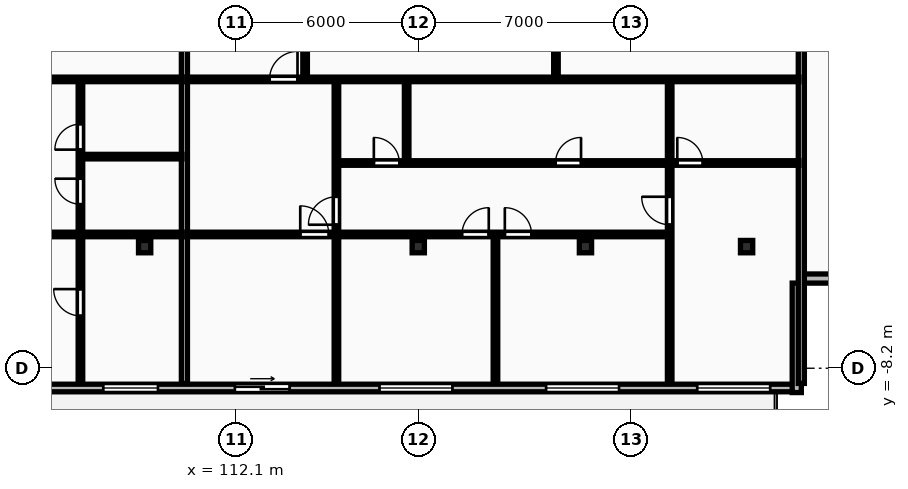
"""IFC4 building model, lengths in metres.
Left out: names, types, materials, properties, quantities, classifications, styles, units other than length and angle.
Written with IfcOpenShell. Run it as: python <this file> out.ifc"""

import sys

from ifc_helpers import new_model, si_unit, direction, frame, frame_2d, origin, origin_2d, place, context, subcontext, project, spatial, rectangle, i_section, extrude, element, fill, save


model = new_model("IFC4")
c1 = context("Model", 3, precision=1e-05, world=origin(), true_north=direction((0.0, 1.0)))
c2 = subcontext(c1, "Body", "Model", "MODEL_VIEW")
j1 = project(units=[si_unit("LENGTHUNIT", "METRE"), si_unit("PLANEANGLEUNIT", "RADIAN")], contexts=[c1])
p1 = place(None, origin())
s1 = spatial("IfcSite", under=j1, at=p1, CompositionType="ELEMENT")
p2 = place(p1, origin())
s2 = spatial("IfcBuilding", under=s1, at=p2, CompositionType="ELEMENT")
p3 = place(p2, frame((0.0, 0.0, 142.9)))
s3 = spatial("IfcBuildingStorey", under=s2, at=p3, CompositionType="ELEMENT", Elevation=142.9)
for number, where, z_axis, x_axis in (
    (1, (109.1, -4.2, 0.0), (0.0, 0.0, 1.0), (1.0, 0.0, 0.0)),
    (2, (118.1, -4.2, 0.0), (0.0, 0.0, 1.0), (1.0, 0.0, 0.0)),
    (3, (123.6, -4.2, 0.0), (0.0, 0.0, 1.0), (1.0, 0.0, 0.0)),
    (4, (128.9, -4.2, 0.0), (0.0, 0.0, 1.0), (1.0, 0.0, 0.0)),
):
    element("IfcColumn", number, at=place(p3, frame(where, z_axis=z_axis, x_axis=x_axis)), inside=s3, PredefinedType="COLUMN", context=c2, shape_type="SweptSolid", body=[
        extrude(i_section(OverallWidth=0.403, OverallDepth=0.406, WebThickness=0.027, FlangeThickness=0.043, FilletRadius=0.015, at=origin_2d()), origin(), (0.0, 0.0, 1.0), 3.6),
    ])
p4 = place(p3, frame((72.7, -8.85, 0.0), z_axis=(0.0, 0.0, 1.0), x_axis=(1.0, 0.0, 0.0)))
e5 = element("IfcWall", 5, at=p4, inside=s3, PredefinedType="STANDARD", context=c2, shape_type="SweptSolid", body=[
    extrude(rectangle(XDim=58.0, YDim=0.25, at=frame_2d((29.0, 0.0))), origin(), (0.0, 0.0, 1.0), 3.31),
])
p5 = place(p4, frame((6.73, 0.0, 0.85)))
e6 = element("IfcOpeningElement", 6, at=p5, cuts=e5, PredefinedType="OPENING", context=c2, shape_type="SweptSolid", body=[
    extrude(rectangle(XDim=2.4, YDim=1.9, at=frame_2d((1.2, 0.95))), frame((0.0, 0.135, 0.0), z_axis=(0.0, -1.0, 0.0), x_axis=(1.0, 0.0, 0.0)), (0.0, 0.0, 1.0), 0.27),
])
p6 = place(p4, frame((12.7, 0.0, 0.85)))
e7 = element("IfcOpeningElement", 7, at=p6, cuts=e5, PredefinedType="OPENING", context=c2, shape_type="SweptSolid", body=[
    extrude(rectangle(XDim=2.4, YDim=1.9, at=frame_2d((1.2, 0.95))), frame((0.0, 0.135, 0.0), z_axis=(0.0, -1.0, 0.0), x_axis=(1.0, 0.0, 0.0)), (0.0, 0.0, 1.0), 0.27),
])
p7 = place(p4, frame((1.45, 0.0, 0.0)))
e8 = element("IfcOpeningElement", 8, at=p7, cuts=e5, PredefinedType="OPENING", context=c2, shape_type="SweptSolid", body=[
    extrude(rectangle(XDim=1.8, YDim=2.2, at=frame_2d((0.9, 1.1))), frame((0.0, 0.135, 0.0), z_axis=(0.0, -1.0, 0.0), x_axis=(1.0, 0.0, 0.0)), (0.0, 0.0, 1.0), 0.27),
])
p8 = place(p4, frame((18.125, 0.0, 0.85)))
e9 = element("IfcOpeningElement", 9, at=p8, cuts=e5, PredefinedType="OPENING", context=c2, shape_type="SweptSolid", body=[
    extrude(rectangle(XDim=2.4, YDim=1.9, at=frame_2d((1.2, 0.95))), frame((0.0, 0.135, 0.0), z_axis=(0.0, -1.0, 0.0), x_axis=(1.0, 0.0, 0.0)), (0.0, 0.0, 1.0), 0.27),
])
p9 = place(p4, frame((27.429, 0.0, 0.0)))
e10 = element("IfcOpeningElement", 10, at=p9, cuts=e5, PredefinedType="OPENING", context=c2, shape_type="SweptSolid", body=[
    extrude(rectangle(XDim=1.8, YDim=2.2, at=frame_2d((0.9, 1.1))), frame((0.0, 0.135, 0.0), z_axis=(0.0, -1.0, 0.0), x_axis=(1.0, 0.0, 0.0)), (0.0, 0.0, 1.0), 0.27),
])
p10 = place(p4, frame((35.038, 0.0, 0.85)))
e11 = element("IfcOpeningElement", 11, at=p10, cuts=e5, PredefinedType="OPENING", context=c2, shape_type="SweptSolid", body=[
    extrude(rectangle(XDim=1.8, YDim=1.8, at=frame_2d((0.9, 0.9))), frame((0.0, 0.135, 0.0), z_axis=(0.0, -1.0, 0.0), x_axis=(1.0, 0.0, 0.0)), (0.0, 0.0, 1.0), 0.27),
])
p11 = place(p4, frame((44.124, 0.0, 0.85)))
e12 = element("IfcOpeningElement", 12, at=p11, cuts=e5, PredefinedType="OPENING", context=c2, shape_type="SweptSolid", body=[
    extrude(rectangle(XDim=2.4, YDim=1.9, at=frame_2d((1.2, 0.95))), frame((0.0, 0.135, 0.0), z_axis=(0.0, -1.0, 0.0), x_axis=(1.0, 0.0, 0.0)), (0.0, 0.0, 1.0), 0.27),
])
p12 = place(p4, frame((49.604, 0.0, 0.85)))
e13 = element("IfcOpeningElement", 13, at=p12, cuts=e5, PredefinedType="OPENING", context=c2, shape_type="SweptSolid", body=[
    extrude(rectangle(XDim=2.4, YDim=1.9, at=frame_2d((1.2, 0.95))), frame((0.0, 0.135, 0.0), z_axis=(0.0, -1.0, 0.0), x_axis=(1.0, 0.0, 0.0)), (0.0, 0.0, 1.0), 0.27),
])
p13 = place(p4, frame((39.368, 0.0, 0.0)))
e14 = element("IfcOpeningElement", 14, at=p13, cuts=e5, PredefinedType="OPENING", context=c2, shape_type="SweptSolid", body=[
    extrude(rectangle(XDim=1.8, YDim=2.2, at=frame_2d((0.9, 1.1))), frame((0.0, 0.135, 0.0), z_axis=(0.0, -1.0, 0.0), x_axis=(1.0, 0.0, 0.0)), (0.0, 0.0, 1.0), 0.27),
])
p14 = place(p4, frame((54.575, 0.0, 0.85)))
e15 = element("IfcOpeningElement", 15, at=p14, cuts=e5, PredefinedType="OPENING", context=c2, shape_type="SweptSolid", body=[
    extrude(rectangle(XDim=2.4, YDim=1.9, at=frame_2d((1.2, 0.95))), frame((0.0, 0.135, 0.0), z_axis=(0.0, -1.0, 0.0), x_axis=(1.0, 0.0, 0.0)), (0.0, 0.0, 1.0), 0.27),
])
for number, where, z_axis, x_axis in (
    (16, (130.55, -9.0, 0.0), (0.0, 0.0, 1.0), (0.0, 1.0, 0.0)),
    (17, (130.7, -5.25, 0.0), (0.0, 0.0, 1.0), (1.0, 0.0, 0.0)),
):
    element("IfcWall", number, at=place(p3, frame(where, z_axis=z_axis, x_axis=x_axis)), inside=s3, PredefinedType="STANDARD", context=c2, shape_type="SweptSolid", body=[
        extrude(rectangle(XDim=3.6, YDim=0.3, at=frame_2d((1.8, 0.0))), origin(), (0.0, 0.0, 1.0), 3.31),
    ])
for number, where, z_axis, x_axis in (
    (18, (130.7, -8.7, 0.0), (0.0, 0.0, 1.0), (0.0, 1.0, 0.0)),
    (19, (110.408, -8.7, 0.0), (0.0, 0.0, 1.0), (0.0, 1.0, 0.0)),
):
    element("IfcWall", number, at=place(p3, frame(where, z_axis=z_axis, x_axis=x_axis)), inside=s3, PredefinedType="PARTITIONING", context=c2, shape_type="SweptSolid", body=[
        extrude(rectangle(XDim=24.57, YDim=0.2, at=frame_2d((12.285, 0.0))), origin(), (0.0, 0.0, 1.0), 3.31),
    ])
p15 = place(p3, frame((107.048, -1.24, 0.0), z_axis=(0.0, 0.0, 1.0), x_axis=(1.0, 0.0, 0.0)))
e20 = element("IfcWall", 20, at=p15, inside=s3, PredefinedType="PARTITIONING", context=c2, shape_type="SweptSolid", body=[
    extrude(rectangle(XDim=3.28, YDim=0.15, at=frame_2d((1.64, 0.0))), origin(), (0.0, 0.0, 1.0), 3.31),
])
p16 = place(p3, frame((106.988, -8.7, 0.0), z_axis=(0.0, 0.0, 1.0), x_axis=(0.0, 1.0, 0.0)))
e21 = element("IfcWall", 21, at=p16, inside=s3, PredefinedType="PARTITIONING", context=c2, shape_type="SweptSolid", body=[
    extrude(rectangle(XDim=9.96, YDim=0.15, at=frame_2d((4.98, 0.0))), origin(), (0.0, 0.0, 1.0), 3.31),
])
p17 = place(p16, frame((5.894, 0.0, 0.0)))
e22 = element("IfcOpeningElement", 22, at=p17, cuts=e21, PredefinedType="OPENING", context=c2, shape_type="SweptSolid", body=[
    extrude(rectangle(XDim=0.84, YDim=2.04, at=frame_2d((0.42, 1.02))), frame((0.0, 0.085, 0.0), z_axis=(0.0, -1.0, 0.0), x_axis=(1.0, 0.0, 0.0)), (0.0, 0.0, 1.0), 0.17),
])
p18 = place(p16, frame((7.69, 0.0, 0.0)))
e23 = element("IfcOpeningElement", 23, at=p18, cuts=e21, PredefinedType="OPENING", context=c2, shape_type="SweptSolid", body=[
    extrude(rectangle(XDim=0.84, YDim=2.04, at=frame_2d((0.42, 1.02))), frame((0.0, 0.085, 0.0), z_axis=(0.0, -1.0, 0.0), x_axis=(1.0, 0.0, 0.0)), (0.0, 0.0, 1.0), 0.17),
])
p19 = place(p16, frame((2.223, 0.0, 0.0)))
e24 = element("IfcOpeningElement", 24, at=p19, cuts=e21, PredefinedType="OPENING", context=c2, shape_type="SweptSolid", body=[
    extrude(rectangle(XDim=0.88, YDim=2.06, at=frame_2d((0.44, 1.03))), frame((0.0, 0.085, 0.0), z_axis=(0.0, -1.0, 0.0), x_axis=(1.0, 0.0, 0.0)), (0.0, 0.0, 1.0), 0.17),
])
p20 = place(p3, frame((95.03, 1.3, 0.0), z_axis=(0.0, 0.0, 1.0), x_axis=(1.0, 0.0, 0.0)))
e25 = element("IfcWall", 25, at=p20, inside=s3, PredefinedType="PARTITIONING", context=c2, shape_type="SweptSolid", body=[
    extrude(rectangle(XDim=15.298, YDim=0.15, at=frame_2d((7.649, 0.0))), origin(), (0.0, 0.0, 1.0), 3.31),
])
p21 = place(p20, frame((2.72, 0.0, 0.0)))
e26 = element("IfcOpeningElement", 26, at=p21, cuts=e25, PredefinedType="OPENING", context=c2, shape_type="SweptSolid", body=[
    extrude(rectangle(XDim=0.92, YDim=2.08, at=frame_2d((0.46, 1.04))), frame((0.0, 0.085, 0.0), z_axis=(0.0, -1.0, 0.0), x_axis=(1.0, 0.0, 0.0)), (0.0, 0.0, 1.0), 0.17),
])
p22 = place(p3, frame((95.03, -3.8, 0.0), z_axis=(0.0, 0.0, 1.0), x_axis=(1.0, 0.0, 0.0)))
e27 = element("IfcWall", 27, at=p22, inside=s3, PredefinedType="PARTITIONING", context=c2, shape_type="SweptSolid", body=[
    extrude(rectangle(XDim=15.298, YDim=0.15, at=frame_2d((7.649, 0.0))), origin(), (0.0, 0.0, 1.0), 3.31),
])
p23 = place(p22, frame((7.179, 0.0, 0.0)))
e28 = element("IfcOpeningElement", 28, at=p23, cuts=e27, PredefinedType="OPENING", context=c2, shape_type="SweptSolid", body=[
    extrude(rectangle(XDim=0.94, YDim=2.1, at=frame_2d((0.47, 1.05))), frame((0.0, 0.085, 0.0), z_axis=(0.0, -1.0, 0.0), x_axis=(1.0, 0.0, 0.0)), (0.0, 0.0, 1.0), 0.17),
])
p24 = place(p3, frame((122.629, 1.34, 0.0), z_axis=(0.0, 0.0, 1.0), x_axis=(0.0, 1.0, 0.0)))
e29 = element("IfcWall", 29, at=p24, inside=s3, PredefinedType="PARTITIONING", context=c2, shape_type="SweptSolid", body=[
    extrude(rectangle(XDim=14.55, YDim=0.15, at=frame_2d((7.275, 0.0))), origin(), (0.0, 0.0, 1.0), 3.31),
])
p25 = place(p24, frame((3.177, 0.0, 0.0)))
e30 = element("IfcOpeningElement", 30, at=p25, cuts=e29, PredefinedType="OPENING", context=c2, shape_type="SweptSolid", body=[
    extrude(rectangle(XDim=0.84, YDim=2.04, at=frame_2d((0.42, 1.02))), frame((0.0, 0.085, 0.0), z_axis=(0.0, -1.0, 0.0), x_axis=(1.0, 0.0, 0.0)), (0.0, 0.0, 1.0), 0.17),
])
p26 = place(p24, frame((7.345, 0.0, 0.0)))
e31 = element("IfcOpeningElement", 31, at=p26, cuts=e29, PredefinedType="OPENING", context=c2, shape_type="SweptSolid", body=[
    extrude(rectangle(XDim=0.88, YDim=2.06, at=frame_2d((0.44, 1.03))), frame((0.0, 0.085, 0.0), z_axis=(0.0, -1.0, 0.0), x_axis=(1.0, 0.0, 0.0)), (0.0, 0.0, 1.0), 0.17),
])
p27 = place(p3, frame((114.378, 1.34, 0.0), z_axis=(0.0, 0.0, 1.0), x_axis=(0.0, 1.0, 0.0)))
e32 = element("IfcWall", 32, at=p27, inside=s3, PredefinedType="PARTITIONING", context=c2, shape_type="SweptSolid", body=[
    extrude(rectangle(XDim=14.55, YDim=0.15, at=frame_2d((7.275, 0.0))), origin(), (0.0, 0.0, 1.0), 3.31),
])
p28 = place(p27, frame((5.965, 0.0, 0.0)))
e33 = element("IfcOpeningElement", 33, at=p28, cuts=e32, PredefinedType="OPENING", context=c2, shape_type="SweptSolid", body=[
    extrude(rectangle(XDim=0.88, YDim=2.06, at=frame_2d((0.44, 1.03))), frame((0.0, 0.085, 0.0), z_axis=(0.0, -1.0, 0.0), x_axis=(1.0, 0.0, 0.0)), (0.0, 0.0, 1.0), 0.17),
])
p29 = place(p3, frame((117.718, -1.43, 0.0), z_axis=(0.0, 0.0, 1.0), x_axis=(0.0, 1.0, 0.0)))
e34 = element("IfcWall", 34, at=p29, inside=s3, PredefinedType="PARTITIONING", context=c2, shape_type="SweptSolid", body=[
    extrude(rectangle(XDim=2.69, YDim=0.15, at=frame_2d((1.345, 0.0))), origin(), (0.0, 0.0, 1.0), 3.31),
])
p30 = place(p3, frame((120.639, -8.7, 0.0), z_axis=(0.0, 0.0, 1.0), x_axis=(0.0, 1.0, 0.0)))
e35 = element("IfcWall", 35, at=p30, inside=s3, PredefinedType="PARTITIONING", context=c2, shape_type="SweptSolid", body=[
    extrude(rectangle(XDim=4.82, YDim=0.15, at=frame_2d((2.41, 0.0))), origin(), (0.0, 0.0, 1.0), 3.31),
])
p31 = place(p3, frame((115.408, -8.7, 0.0), z_axis=(0.0, 0.0, 1.0), x_axis=(0.0, 1.0, 0.0)))
e36 = element("IfcWall", 36, at=p31, inside=s3, PredefinedType="PARTITIONING", context=c2, shape_type="SweptSolid", body=[
    extrude(rectangle(XDim=9.96, YDim=0.15, at=frame_2d((4.98, 0.0))), origin(), (0.0, 0.0, 1.0), 3.31),
])
p32 = place(p31, frame((5.22, 0.0, 0.0)))
e37 = element("IfcOpeningElement", 37, at=p32, cuts=e36, PredefinedType="OPENING", context=c2, shape_type="SweptSolid", body=[
    extrude(rectangle(XDim=0.92, YDim=2.08, at=frame_2d((0.46, 1.04))), frame((0.0, 0.085, 0.0), z_axis=(0.0, -1.0, 0.0), x_axis=(1.0, 0.0, 0.0)), (0.0, 0.0, 1.0), 0.17),
])
p33 = place(p3, frame((126.37, -1.43, 0.0), z_axis=(0.0, 0.0, 1.0), x_axis=(0.0, 1.0, 0.0)))
e38 = element("IfcWall", 38, at=p33, inside=s3, PredefinedType="PARTITIONING", context=c2, shape_type="SweptSolid", body=[
    extrude(rectangle(XDim=2.69, YDim=0.15, at=frame_2d((1.345, 0.0))), origin(), (0.0, 0.0, 1.0), 3.31),
])
p34 = place(p3, frame((126.37, -8.7, 0.0), z_axis=(0.0, 0.0, 1.0), x_axis=(0.0, 1.0, 0.0)))
e39 = element("IfcWall", 39, at=p34, inside=s3, PredefinedType="PARTITIONING", context=c2, shape_type="SweptSolid", body=[
    extrude(rectangle(XDim=7.23, YDim=0.15, at=frame_2d((3.615, 0.0))), origin(), (0.0, 0.0, 1.0), 3.31),
])
p35 = place(p34, frame((5.22, 0.0, 0.0)))
e40 = element("IfcOpeningElement", 40, at=p35, cuts=e39, PredefinedType="OPENING", context=c2, shape_type="SweptSolid", body=[
    extrude(rectangle(XDim=0.92, YDim=2.08, at=frame_2d((0.46, 1.04))), frame((0.0, 0.085, 0.0), z_axis=(0.0, -1.0, 0.0), x_axis=(1.0, 0.0, 0.0)), (0.0, 0.0, 1.0), 0.17),
])
p36 = place(p3, frame((115.448, -1.45, 0.0), z_axis=(0.0, 0.0, 1.0), x_axis=(1.0, 0.0, 0.0)))
e41 = element("IfcWall", 41, at=p36, inside=s3, PredefinedType="PARTITIONING", context=c2, shape_type="SweptSolid", body=[
    extrude(rectangle(XDim=15.172, YDim=0.15, at=frame_2d((7.586, 0.0))), origin(), (0.0, 0.0, 1.0), 3.31),
])
p37 = place(p36, frame((1.191, 0.0, 0.0)))
e42 = element("IfcOpeningElement", 42, at=p37, cuts=e41, PredefinedType="OPENING", context=c2, shape_type="SweptSolid", body=[
    extrude(rectangle(XDim=0.84, YDim=2.04, at=frame_2d((0.42, 1.02))), frame((0.0, 0.085, 0.0), z_axis=(0.0, -1.0, 0.0), x_axis=(1.0, 0.0, 0.0)), (0.0, 0.0, 1.0), 0.17),
])
p38 = place(p36, frame((7.166, 0.0, 0.0)))
e43 = element("IfcOpeningElement", 43, at=p38, cuts=e41, PredefinedType="OPENING", context=c2, shape_type="SweptSolid", body=[
    extrude(rectangle(XDim=0.84, YDim=2.04, at=frame_2d((0.42, 1.02))), frame((0.0, 0.085, 0.0), z_axis=(0.0, -1.0, 0.0), x_axis=(1.0, 0.0, 0.0)), (0.0, 0.0, 1.0), 0.17),
])
p39 = place(p36, frame((11.172, 0.0, 0.0)))
e44 = element("IfcOpeningElement", 44, at=p39, cuts=e41, PredefinedType="OPENING", context=c2, shape_type="SweptSolid", body=[
    extrude(rectangle(XDim=0.84, YDim=2.04, at=frame_2d((0.42, 1.02))), frame((0.0, 0.085, 0.0), z_axis=(0.0, -1.0, 0.0), x_axis=(1.0, 0.0, 0.0)), (0.0, 0.0, 1.0), 0.17),
])
p40 = place(p3, frame((110.488, 1.3, 0.0), z_axis=(0.0, 0.0, 1.0), x_axis=(1.0, 0.0, 0.0)))
e45 = element("IfcWall", 45, at=p40, inside=s3, PredefinedType="PARTITIONING", context=c2, shape_type="SweptSolid", body=[
    extrude(rectangle(XDim=20.132, YDim=0.15, at=frame_2d((10.066, 0.0))), origin(), (0.0, 0.0, 1.0), 3.31),
])
p41 = place(p40, frame((2.72, 0.0, 0.0)))
e46 = element("IfcOpeningElement", 46, at=p41, cuts=e45, PredefinedType="OPENING", context=c2, shape_type="SweptSolid", body=[
    extrude(rectangle(XDim=0.92, YDim=2.08, at=frame_2d((0.46, 1.04))), frame((0.0, 0.085, 0.0), z_axis=(0.0, -1.0, 0.0), x_axis=(1.0, 0.0, 0.0)), (0.0, 0.0, 1.0), 0.17),
])
p42 = place(p3, frame((110.488, -3.8, 0.0), z_axis=(0.0, 0.0, 1.0), x_axis=(1.0, 0.0, 0.0)))
e47 = element("IfcWall", 47, at=p42, inside=s3, PredefinedType="PARTITIONING", context=c2, shape_type="SweptSolid", body=[
    extrude(rectangle(XDim=15.882, YDim=0.15, at=frame_2d((7.941, 0.0))), origin(), (0.0, 0.0, 1.0), 3.31),
])
p43 = place(p42, frame((3.73, 0.0, 0.0)))
e48 = element("IfcOpeningElement", 48, at=p43, cuts=e47, PredefinedType="OPENING", context=c2, shape_type="SweptSolid", body=[
    extrude(rectangle(XDim=0.94, YDim=2.1, at=frame_2d((0.47, 1.05))), frame((0.0, 0.085, 0.0), z_axis=(0.0, -1.0, 0.0), x_axis=(1.0, 0.0, 0.0)), (0.0, 0.0, 1.0), 0.17),
])
p44 = place(p42, frame((9.051, 0.0, 0.0)))
e49 = element("IfcOpeningElement", 49, at=p44, cuts=e47, PredefinedType="OPENING", context=c2, shape_type="SweptSolid", body=[
    extrude(rectangle(XDim=0.88, YDim=2.06, at=frame_2d((0.44, 1.03))), frame((0.0, 0.085, 0.0), z_axis=(0.0, -1.0, 0.0), x_axis=(1.0, 0.0, 0.0)), (0.0, 0.0, 1.0), 0.17),
])
p45 = place(p42, frame((10.459, 0.0, 0.0)))
e50 = element("IfcOpeningElement", 50, at=p45, cuts=e47, PredefinedType="OPENING", context=c2, shape_type="SweptSolid", body=[
    extrude(rectangle(XDim=0.88, YDim=2.06, at=frame_2d((0.44, 1.03))), frame((0.0, 0.085, 0.0), z_axis=(0.0, -1.0, 0.0), x_axis=(1.0, 0.0, 0.0)), (0.0, 0.0, 1.0), 0.17),
])
p46 = place(p10, origin())
e51 = element("IfcWindow", 51, at=p46, inside=s3, PartitioningType="SINGLE_PANEL", PredefinedType="WINDOW", context=c2, shape_type="SweptSolid", body=[
    extrude(rectangle(XDim=1.8, YDim=1.8, at=frame_2d((0.9, 0.9))), frame((0.0, 0.03, 0.0), z_axis=(0.0, -1.0, 0.0), x_axis=(1.0, 0.0, 0.0)), (0.0, 0.0, 1.0), 0.06),
])
fill(e11, e51)
p47 = place(p11, origin())
e52 = element("IfcWindow", 52, at=p47, inside=s3, PartitioningType="DOUBLE_PANEL_VERTICAL", PredefinedType="WINDOW", context=c2, shape_type="SweptSolid", body=[
    extrude(rectangle(XDim=2.4, YDim=1.9, at=frame_2d((1.2, 0.95))), frame((0.0, 0.03, 0.0), z_axis=(0.0, -1.0, 0.0), x_axis=(1.0, 0.0, 0.0)), (0.0, 0.0, 1.0), 0.06),
])
fill(e12, e52)
p48 = place(p12, origin())
e53 = element("IfcWindow", 53, at=p48, inside=s3, PartitioningType="DOUBLE_PANEL_VERTICAL", PredefinedType="WINDOW", context=c2, shape_type="SweptSolid", body=[
    extrude(rectangle(XDim=2.4, YDim=1.9, at=frame_2d((1.2, 0.95))), frame((0.0, 0.03, 0.0), z_axis=(0.0, -1.0, 0.0), x_axis=(1.0, 0.0, 0.0)), (0.0, 0.0, 1.0), 0.06),
])
fill(e13, e53)
p49 = place(p13, origin())
e54 = element("IfcDoor", 54, at=p49, inside=s3, OperationType="SLIDING_TO_RIGHT", PredefinedType="DOOR", context=c2, shape_type="SweptSolid", body=[
    extrude(rectangle(XDim=1.8, YDim=2.2, at=frame_2d((0.9, 1.1))), frame((0.0, 0.025, 0.0), z_axis=(0.0, -1.0, 0.0), x_axis=(1.0, 0.0, 0.0)), (0.0, 0.0, 1.0), 0.05),
])
fill(e14, e54)
p50 = place(p14, origin())
e55 = element("IfcWindow", 55, at=p50, inside=s3, PartitioningType="DOUBLE_PANEL_VERTICAL", PredefinedType="WINDOW", context=c2, shape_type="SweptSolid", body=[
    extrude(rectangle(XDim=2.4, YDim=1.9, at=frame_2d((1.2, 0.95))), frame((0.0, 0.03, 0.0), z_axis=(0.0, -1.0, 0.0), x_axis=(1.0, 0.0, 0.0)), (0.0, 0.0, 1.0), 0.06),
])
fill(e15, e55)
p51 = place(p17, origin())
e56 = element("IfcDoor", 56, at=p51, inside=s3, OperationType="SINGLE_SWING_RIGHT", PredefinedType="DOOR", context=c2, shape_type="SweptSolid", body=[
    extrude(rectangle(XDim=0.84, YDim=2.04, at=frame_2d((0.42, 1.02))), frame((0.0, 0.025, 0.0), z_axis=(0.0, -1.0, 0.0), x_axis=(1.0, 0.0, 0.0)), (0.0, 0.0, 1.0), 0.05),
])
fill(e22, e56)
p52 = place(p18, origin())
e57 = element("IfcDoor", 57, at=p52, inside=s3, OperationType="SINGLE_SWING_LEFT", PredefinedType="DOOR", context=c2, shape_type="SweptSolid", body=[
    extrude(rectangle(XDim=0.84, YDim=2.04, at=frame_2d((0.42, 1.02))), frame((0.0, 0.025, 0.0), z_axis=(0.0, -1.0, 0.0), x_axis=(1.0, 0.0, 0.0)), (0.0, 0.0, 1.0), 0.05),
])
fill(e23, e57)
p53 = place(p19, origin())
e58 = element("IfcDoor", 58, at=p53, inside=s3, OperationType="SINGLE_SWING_RIGHT", PredefinedType="DOOR", context=c2, shape_type="SweptSolid", body=[
    extrude(rectangle(XDim=0.88, YDim=2.06, at=frame_2d((0.44, 1.03))), frame((0.0, 0.025, 0.0), z_axis=(0.0, -1.0, 0.0), x_axis=(1.0, 0.0, 0.0)), (0.0, 0.0, 1.0), 0.05),
])
fill(e24, e58)
p54 = place(p32, origin())
e59 = element("IfcDoor", 59, at=p54, inside=s3, OperationType="SINGLE_SWING_LEFT", PredefinedType="DOOR", context=c2, shape_type="SweptSolid", body=[
    extrude(rectangle(XDim=0.92, YDim=2.08, at=frame_2d((0.46, 1.04))), frame((0.0, 0.025, 0.0), z_axis=(0.0, -1.0, 0.0), x_axis=(1.0, 0.0, 0.0)), (0.0, 0.0, 1.0), 0.05),
])
fill(e37, e59)
p55 = place(p35, origin())
e60 = element("IfcDoor", 60, at=p55, inside=s3, OperationType="SINGLE_SWING_RIGHT", PredefinedType="DOOR", context=c2, shape_type="SweptSolid", body=[
    extrude(rectangle(XDim=0.92, YDim=2.08, at=frame_2d((0.46, 1.04))), frame((0.0, 0.025, 0.0), z_axis=(0.0, -1.0, 0.0), x_axis=(1.0, 0.0, 0.0)), (0.0, 0.0, 1.0), 0.05),
])
fill(e40, e60)
p56 = place(p37, origin())
e61 = element("IfcDoor", 61, at=p56, inside=s3, OperationType="SINGLE_SWING_LEFT", PredefinedType="DOOR", context=c2, shape_type="SweptSolid", body=[
    extrude(rectangle(XDim=0.84, YDim=2.04, at=frame_2d((0.42, 1.02))), frame((0.0, 0.025, 0.0), z_axis=(0.0, -1.0, 0.0), x_axis=(1.0, 0.0, 0.0)), (0.0, 0.0, 1.0), 0.05),
])
fill(e42, e61)
p57 = place(p38, origin())
e62 = element("IfcDoor", 62, at=p57, inside=s3, OperationType="SINGLE_SWING_RIGHT", PredefinedType="DOOR", context=c2, shape_type="SweptSolid", body=[
    extrude(rectangle(XDim=0.84, YDim=2.04, at=frame_2d((0.42, 1.02))), frame((0.0, 0.025, 0.0), z_axis=(0.0, -1.0, 0.0), x_axis=(1.0, 0.0, 0.0)), (0.0, 0.0, 1.0), 0.05),
])
fill(e43, e62)
p58 = place(p39, origin())
e63 = element("IfcDoor", 63, at=p58, inside=s3, OperationType="SINGLE_SWING_LEFT", PredefinedType="DOOR", context=c2, shape_type="SweptSolid", body=[
    extrude(rectangle(XDim=0.84, YDim=2.04, at=frame_2d((0.42, 1.02))), frame((0.0, 0.025, 0.0), z_axis=(0.0, -1.0, 0.0), x_axis=(1.0, 0.0, 0.0)), (0.0, 0.0, 1.0), 0.05),
])
fill(e44, e63)
p59 = place(p41, origin())
e64 = element("IfcDoor", 64, at=p59, inside=s3, OperationType="SINGLE_SWING_RIGHT", PredefinedType="DOOR", context=c2, shape_type="SweptSolid", body=[
    extrude(rectangle(XDim=0.92, YDim=2.08, at=frame_2d((0.46, 1.04))), frame((0.0, 0.025, 0.0), z_axis=(0.0, -1.0, 0.0), x_axis=(1.0, 0.0, 0.0)), (0.0, 0.0, 1.0), 0.05),
])
fill(e46, e64)
p60 = place(p43, origin())
e65 = element("IfcDoor", 65, at=p60, inside=s3, OperationType="SINGLE_SWING_LEFT", PredefinedType="DOOR", context=c2, shape_type="SweptSolid", body=[
    extrude(rectangle(XDim=0.94, YDim=2.1, at=frame_2d((0.47, 1.05))), frame((0.0, 0.025, 0.0), z_axis=(0.0, -1.0, 0.0), x_axis=(1.0, 0.0, 0.0)), (0.0, 0.0, 1.0), 0.05),
])
fill(e48, e65)
p61 = place(p44, origin())
e66 = element("IfcDoor", 66, at=p61, inside=s3, OperationType="SINGLE_SWING_RIGHT", PredefinedType="DOOR", context=c2, shape_type="SweptSolid", body=[
    extrude(rectangle(XDim=0.88, YDim=2.06, at=frame_2d((0.44, 1.03))), frame((0.0, 0.025, 0.0), z_axis=(0.0, -1.0, 0.0), x_axis=(1.0, 0.0, 0.0)), (0.0, 0.0, 1.0), 0.05),
])
fill(e49, e66)
p62 = place(p45, origin())
e67 = element("IfcDoor", 67, at=p62, inside=s3, OperationType="SINGLE_SWING_LEFT", PredefinedType="DOOR", context=c2, shape_type="SweptSolid", body=[
    extrude(rectangle(XDim=0.88, YDim=2.06, at=frame_2d((0.44, 1.03))), frame((0.0, 0.025, 0.0), z_axis=(0.0, -1.0, 0.0), x_axis=(1.0, 0.0, 0.0)), (0.0, 0.0, 1.0), 0.05),
])
fill(e50, e67)
save(model, sys.argv[1])
